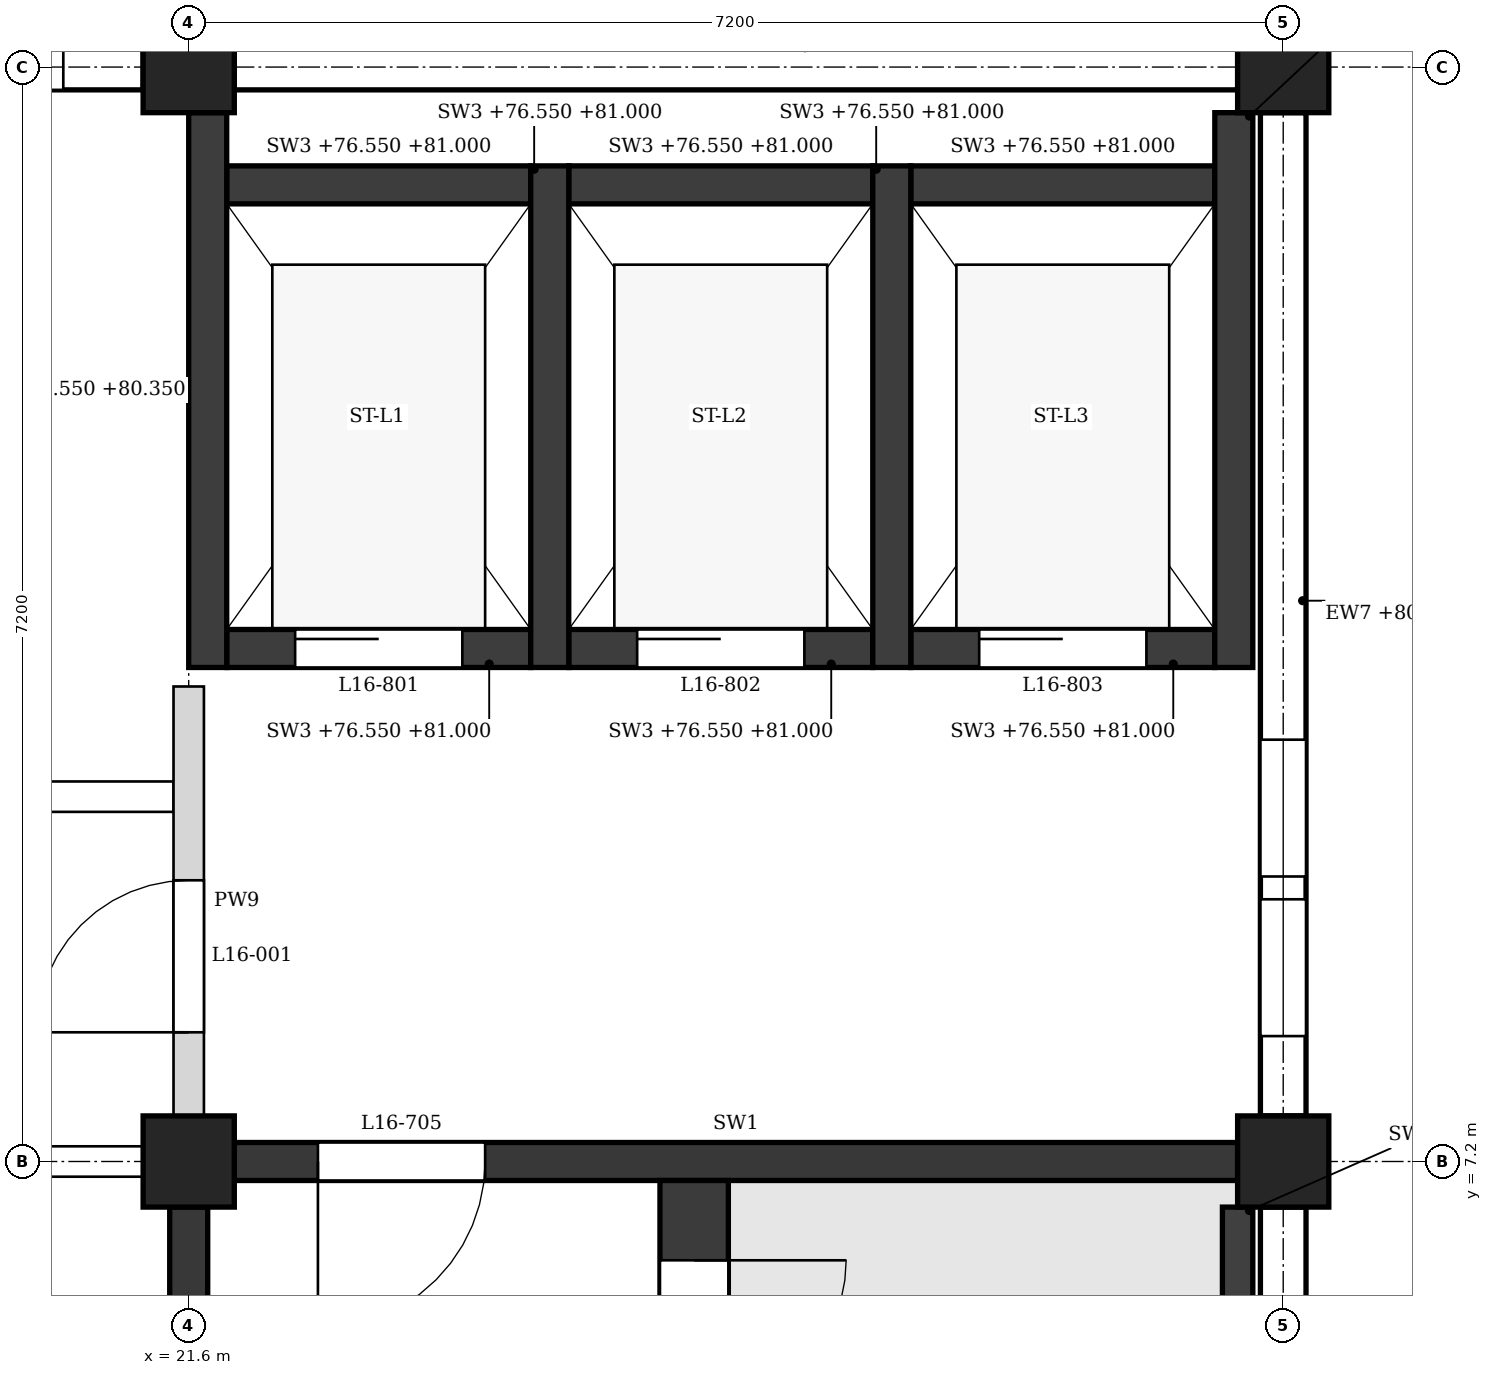
"""IFC4 building model, lengths in metres.
Left out: names, types, materials, properties, quantities, classifications, styles, units other than length and angle.
Written with IfcOpenShell. Run it as: python <this file> out.ifc"""

import sys

from ifc_helpers import new_model, si_unit, direction, frame, frame_2d, origin, origin_2d, place, context, subcontext, project, spatial, polyline, rectangle, outline, extrude, element, fill, save


model = new_model("IFC4")
c1 = context("Model", 3, precision=1e-05, world=origin(), true_north=direction((0.0, 1.0)))
c2 = subcontext(c1, "Body", "Model", "MODEL_VIEW")
j1 = project(units=[si_unit("LENGTHUNIT", "METRE"), si_unit("PLANEANGLEUNIT", "RADIAN")], contexts=[c1])
p1 = place(None, origin())
s1 = spatial("IfcSite", under=j1, at=p1, CompositionType="ELEMENT")
p2 = place(p1, origin())
s2 = spatial("IfcBuilding", under=s1, at=p2, CompositionType="ELEMENT")
p3 = place(p2, frame((0.0, 0.0, 76.8)))
s3 = spatial("IfcBuildingStorey", under=s2, at=p3, CompositionType="ELEMENT", Elevation=76.8)
for number, where, z_axis, x_axis in (
    (1, (21.6, 7.2, 0.0), (0.0, 0.0, 1.0), (1.0, 0.0, 0.0)),
    (2, (21.6, 14.4, 0.0), (0.0, 0.0, 1.0), (1.0, 0.0, 0.0)),
    (3, (28.8, 7.2, 0.0), (0.0, 0.0, 1.0), (1.0, 0.0, 0.0)),
    (4, (28.8, 14.4, 0.0), (0.0, 0.0, 1.0), (1.0, 0.0, 0.0)),
):
    element("IfcColumn", number, at=place(p3, frame(where, z_axis=z_axis, x_axis=x_axis)), inside=s3, PredefinedType="COLUMN", context=c2, shape_type="SweptSolid", body=[
        extrude(rectangle(XDim=0.6, YDim=0.6, at=origin_2d()), origin(), (0.0, 0.0, 1.0), 4.5),
    ])
p4 = place(p3, frame((28.8, 0.3, 0.0), z_axis=(0.0, 0.0, 1.0), x_axis=(0.0, 1.0, 0.0)))
e5 = element("IfcWall", 5, at=p4, inside=s3, PredefinedType="STANDARD", context=c2, shape_type="SweptSolid", body=[
    extrude(rectangle(XDim=6.6, YDim=0.3, at=frame_2d((3.3, 0.0))), origin(), (0.0, 0.0, 1.0), 3.6),
])
p5 = place(p4, frame((1.05, 0.0, 0.9)))
e6 = element("IfcOpeningElement", 6, at=p5, cuts=e5, PredefinedType="OPENING", context=c2, shape_type="SweptSolid", body=[
    extrude(outline(polyline([(0.0, 0.0), (0.9, 0.0), (0.9, 2.15), (0.45, 2.6), (0.0, 2.15), (0.0, 0.0)])), frame((0.0, 0.16, 0.0), z_axis=(0.0, -1.0, 0.0), x_axis=(1.0, 0.0, 0.0)), (0.0, 0.0, 1.0), 0.32),
])
p6 = place(p4, frame((4.65, 0.0, 0.9)))
e7 = element("IfcOpeningElement", 7, at=p6, cuts=e5, PredefinedType="OPENING", context=c2, shape_type="SweptSolid", body=[
    extrude(outline(polyline([(0.0, 0.0), (0.9, 0.0), (0.9, 2.15), (0.45, 2.6), (0.0, 2.15), (0.0, 0.0)])), frame((0.0, 0.16, 0.0), z_axis=(0.0, -1.0, 0.0), x_axis=(1.0, 0.0, 0.0)), (0.0, 0.0, 1.0), 0.32),
])
p7 = place(p3, frame((28.8, 7.5, 0.0), z_axis=(0.0, 0.0, 1.0), x_axis=(0.0, 1.0, 0.0)))
e8 = element("IfcWall", 8, at=p7, inside=s3, PredefinedType="STANDARD", context=c2, shape_type="SweptSolid", body=[
    extrude(rectangle(XDim=6.6, YDim=0.3, at=frame_2d((3.3, 0.0))), origin(), (0.0, 0.0, 1.0), 3.6),
])
p8 = place(p7, frame((0.525, 0.0, 0.9)))
e9 = element("IfcOpeningElement", 9, at=p8, cuts=e8, PredefinedType="OPENING", context=c2, shape_type="SweptSolid", body=[
    extrude(outline(polyline([(0.0, 0.0), (0.9, 0.0), (0.9, 2.15), (0.45, 2.6), (0.0, 2.15), (0.0, 0.0)])), frame((0.0, 0.16, 0.0), z_axis=(0.0, -1.0, 0.0), x_axis=(1.0, 0.0, 0.0)), (0.0, 0.0, 1.0), 0.32),
])
p9 = place(p7, frame((1.575, 0.0, 0.9)))
e10 = element("IfcOpeningElement", 10, at=p9, cuts=e8, PredefinedType="OPENING", context=c2, shape_type="SweptSolid", body=[
    extrude(outline(polyline([(0.0, 0.0), (0.9, 0.0), (0.9, 2.15), (0.45, 2.6), (0.0, 2.15), (0.0, 0.0)])), frame((0.0, 0.16, 0.0), z_axis=(0.0, -1.0, 0.0), x_axis=(1.0, 0.0, 0.0)), (0.0, 0.0, 1.0), 0.32),
])
p10 = place(p3, frame((28.5, 14.4, 0.0), z_axis=(0.0, 0.0, 1.0), x_axis=(-1.0, 0.0, 0.0)))
e11 = element("IfcWall", 11, at=p10, inside=s3, PredefinedType="STANDARD", context=c2, shape_type="SweptSolid", body=[
    extrude(rectangle(XDim=6.6, YDim=0.3, at=frame_2d((3.3, 0.0))), origin(), (0.0, 0.0, 1.0), 3.6),
])
p11 = place(p3, frame((21.3, 14.4, 0.0), z_axis=(0.0, 0.0, 1.0), x_axis=(-1.0, 0.0, 0.0)))
e12 = element("IfcWall", 12, at=p11, inside=s3, PredefinedType="STANDARD", context=c2, shape_type="SweptSolid", body=[
    extrude(rectangle(XDim=6.6, YDim=0.3, at=frame_2d((3.3, 0.0))), origin(), (0.0, 0.0, 1.0), 3.6),
])
p12 = place(p11, frame((0.525, 0.0, 0.9)))
e13 = element("IfcOpeningElement", 13, at=p12, cuts=e12, PredefinedType="OPENING", context=c2, shape_type="SweptSolid", body=[
    extrude(outline(polyline([(0.0, 0.0), (0.9, 0.0), (0.9, 2.15), (0.45, 2.6), (0.0, 2.15), (0.0, 0.0)])), frame((0.0, 0.16, 0.0), z_axis=(0.0, -1.0, 0.0), x_axis=(1.0, 0.0, 0.0)), (0.0, 0.0, 1.0), 0.32),
])
p13 = place(p11, frame((1.575, 0.0, 0.9)))
e14 = element("IfcOpeningElement", 14, at=p13, cuts=e12, PredefinedType="OPENING", context=c2, shape_type="SweptSolid", body=[
    extrude(outline(polyline([(0.0, 0.0), (0.9, 0.0), (0.9, 2.15), (0.45, 2.6), (0.0, 2.15), (0.0, 0.0)])), frame((0.0, 0.16, 0.0), z_axis=(0.0, -1.0, 0.0), x_axis=(1.0, 0.0, 0.0)), (0.0, 0.0, 1.0), 0.32),
])
p14 = place(p11, frame((4.125, 0.0, 0.9)))
e15 = element("IfcOpeningElement", 15, at=p14, cuts=e12, PredefinedType="OPENING", context=c2, shape_type="SweptSolid", body=[
    extrude(outline(polyline([(0.0, 0.0), (0.9, 0.0), (0.9, 2.15), (0.45, 2.6), (0.0, 2.15), (0.0, 0.0)])), frame((0.0, 0.16, 0.0), z_axis=(0.0, -1.0, 0.0), x_axis=(1.0, 0.0, 0.0)), (0.0, 0.0, 1.0), 0.32),
])
p15 = place(p11, frame((5.175, 0.0, 0.9)))
e16 = element("IfcOpeningElement", 16, at=p15, cuts=e12, PredefinedType="OPENING", context=c2, shape_type="SweptSolid", body=[
    extrude(outline(polyline([(0.0, 0.0), (0.9, 0.0), (0.9, 2.15), (0.45, 2.6), (0.0, 2.15), (0.0, 0.0)])), frame((0.0, 0.16, 0.0), z_axis=(0.0, -1.0, 0.0), x_axis=(1.0, 0.0, 0.0)), (0.0, 0.0, 1.0), 0.32),
])
p16 = place(p3, frame((21.9, 7.2, 0.0), z_axis=(0.0, 0.0, 1.0), x_axis=(1.0, 0.0, 0.0)))
e17 = element("IfcWall", 17, at=p16, inside=s3, PredefinedType="SHEAR", context=c2, shape_type="SweptSolid", body=[
    extrude(rectangle(XDim=6.6, YDim=0.25, at=frame_2d((3.3, 0.0))), origin(), (0.0, 0.0, 1.0), 3.55),
])
p17 = place(p16, frame((0.55, 0.0, 0.0)))
e18 = element("IfcOpeningElement", 18, at=p17, cuts=e17, PredefinedType="OPENING", context=c2, shape_type="SweptSolid", body=[
    extrude(rectangle(XDim=1.1, YDim=2.1, at=frame_2d((0.55, 1.05))), frame((0.0, 0.135, 0.0), z_axis=(0.0, -1.0, 0.0), x_axis=(1.0, 0.0, 0.0)), (0.0, 0.0, 1.0), 0.27),
])
p18 = place(p3, frame((21.6, 0.3, 0.0), z_axis=(0.0, 0.0, 1.0), x_axis=(0.0, 1.0, 0.0)))
e19 = element("IfcWall", 19, at=p18, inside=s3, PredefinedType="SHEAR", context=c2, shape_type="SweptSolid", body=[
    extrude(rectangle(XDim=6.6, YDim=0.25, at=frame_2d((3.3, 0.0))), origin(), (0.0, 0.0, 1.0), 3.55),
])
p19 = place(p3, frame((28.5, 5.85, -0.25), z_axis=(0.0, 0.0, 1.0), x_axis=(0.0, 1.0, 0.0)))
e20 = element("IfcWall", 20, at=p19, inside=s3, PredefinedType="SHEAR", context=c2, shape_type="SweptSolid", body=[
    extrude(rectangle(XDim=1.05, YDim=0.2, at=frame_2d((0.525, 0.0))), origin(), (0.0, 0.0, 1.0), 4.45),
])
p20 = place(p3, frame((24.925, 0.15, 0.0), z_axis=(0.0, 0.0, 1.0), x_axis=(0.0, 1.0, 0.0)))
e21 = element("IfcWall", 21, at=p20, inside=s3, PredefinedType="SHEAR", context=c2, shape_type="SweptSolid", body=[
    extrude(rectangle(XDim=6.925, YDim=0.45, at=frame_2d((3.462, 0.0))), origin(), (0.0, 0.0, 1.0), 4.2),
])
p21 = place(p20, frame((5.4, 0.0, 0.0)))
e22 = element("IfcOpeningElement", 22, at=p21, cuts=e21, PredefinedType="OPENING", context=c2, shape_type="SweptSolid", body=[
    extrude(rectangle(XDim=1.0, YDim=2.1, at=frame_2d((0.5, 1.05))), frame((0.0, 0.235, 0.0), z_axis=(0.0, -1.0, 0.0), x_axis=(1.0, 0.0, 0.0)), (0.0, 0.0, 1.0), 0.47),
])
p22 = place(p3, frame((21.725, 10.45, -0.25), z_axis=(0.0, 0.0, 1.0), x_axis=(0.0, 1.0, 0.0)))
e23 = element("IfcWall", 23, at=p22, inside=s3, PredefinedType="SHEAR", context=c2, shape_type="SweptSolid", body=[
    extrude(rectangle(XDim=3.65, YDim=0.25, at=frame_2d((1.825, 0.0))), origin(), (0.0, 0.0, 1.0), 3.8),
])
for number, where, z_axis, x_axis in (
    (24, (23.975, 10.45, -0.25), (0.0, 0.0, 1.0), (0.0, 1.0, 0.0)),
    (25, (26.225, 10.45, -0.25), (0.0, 0.0, 1.0), (0.0, 1.0, 0.0)),
):
    element("IfcWall", number, at=place(p3, frame(where, z_axis=z_axis, x_axis=x_axis)), inside=s3, PredefinedType="SHEAR", context=c2, shape_type="SweptSolid", body=[
        extrude(rectangle(XDim=3.3, YDim=0.25, at=frame_2d((1.65, 0.0))), origin(), (0.0, 0.0, 1.0), 4.45),
    ])
p23 = place(p3, frame((28.475, 10.45, -0.25), z_axis=(0.0, 0.0, 1.0), x_axis=(0.0, 1.0, 0.0)))
e26 = element("IfcWall", 26, at=p23, inside=s3, PredefinedType="SHEAR", context=c2, shape_type="SweptSolid", body=[
    extrude(rectangle(XDim=3.65, YDim=0.25, at=frame_2d((1.825, 0.0))), origin(), (0.0, 0.0, 1.0), 4.45),
])
p24 = place(p3, frame((21.85, 10.575, -0.25), z_axis=(0.0, 0.0, 1.0), x_axis=(1.0, 0.0, 0.0)))
e27 = element("IfcWall", 27, at=p24, inside=s3, PredefinedType="SHEAR", context=c2, shape_type="SweptSolid", body=[
    extrude(rectangle(XDim=2.0, YDim=0.25, at=frame_2d((1.0, 0.0))), origin(), (0.0, 0.0, 1.0), 4.45),
])
p25 = place(p24, frame((0.45, 0.0, 0.25)))
e28 = element("IfcOpeningElement", 28, at=p25, cuts=e27, PredefinedType="OPENING", context=c2, shape_type="SweptSolid", body=[
    extrude(rectangle(XDim=1.1, YDim=2.1, at=frame_2d((0.55, 1.05))), frame((0.0, 0.135, 0.0), z_axis=(0.0, -1.0, 0.0), x_axis=(1.0, 0.0, 0.0)), (0.0, 0.0, 1.0), 0.27),
])
p26 = place(p3, frame((21.85, 13.625, -0.25), z_axis=(0.0, 0.0, 1.0), x_axis=(1.0, 0.0, 0.0)))
e29 = element("IfcWall", 29, at=p26, inside=s3, PredefinedType="SHEAR", context=c2, shape_type="SweptSolid", body=[
    extrude(rectangle(XDim=2.0, YDim=0.25, at=frame_2d((1.0, 0.0))), origin(), (0.0, 0.0, 1.0), 4.45),
])
p27 = place(p3, frame((24.1, 10.575, -0.25), z_axis=(0.0, 0.0, 1.0), x_axis=(1.0, 0.0, 0.0)))
e30 = element("IfcWall", 30, at=p27, inside=s3, PredefinedType="SHEAR", context=c2, shape_type="SweptSolid", body=[
    extrude(rectangle(XDim=2.0, YDim=0.25, at=frame_2d((1.0, 0.0))), origin(), (0.0, 0.0, 1.0), 4.45),
])
p28 = place(p27, frame((0.45, 0.0, 0.25)))
e31 = element("IfcOpeningElement", 31, at=p28, cuts=e30, PredefinedType="OPENING", context=c2, shape_type="SweptSolid", body=[
    extrude(rectangle(XDim=1.1, YDim=2.1, at=frame_2d((0.55, 1.05))), frame((0.0, 0.135, 0.0), z_axis=(0.0, -1.0, 0.0), x_axis=(1.0, 0.0, 0.0)), (0.0, 0.0, 1.0), 0.27),
])
p29 = place(p3, frame((24.1, 13.625, -0.25), z_axis=(0.0, 0.0, 1.0), x_axis=(1.0, 0.0, 0.0)))
e32 = element("IfcWall", 32, at=p29, inside=s3, PredefinedType="SHEAR", context=c2, shape_type="SweptSolid", body=[
    extrude(rectangle(XDim=2.0, YDim=0.25, at=frame_2d((1.0, 0.0))), origin(), (0.0, 0.0, 1.0), 4.45),
])
p30 = place(p3, frame((26.35, 10.575, -0.25), z_axis=(0.0, 0.0, 1.0), x_axis=(1.0, 0.0, 0.0)))
e33 = element("IfcWall", 33, at=p30, inside=s3, PredefinedType="SHEAR", context=c2, shape_type="SweptSolid", body=[
    extrude(rectangle(XDim=2.0, YDim=0.25, at=frame_2d((1.0, 0.0))), origin(), (0.0, 0.0, 1.0), 4.45),
])
p31 = place(p30, frame((0.45, 0.0, 0.25)))
e34 = element("IfcOpeningElement", 34, at=p31, cuts=e33, PredefinedType="OPENING", context=c2, shape_type="SweptSolid", body=[
    extrude(rectangle(XDim=1.1, YDim=2.1, at=frame_2d((0.55, 1.05))), frame((0.0, 0.135, 0.0), z_axis=(0.0, -1.0, 0.0), x_axis=(1.0, 0.0, 0.0)), (0.0, 0.0, 1.0), 0.27),
])
p32 = place(p3, frame((26.35, 13.625, -0.25), z_axis=(0.0, 0.0, 1.0), x_axis=(1.0, 0.0, 0.0)))
e35 = element("IfcWall", 35, at=p32, inside=s3, PredefinedType="SHEAR", context=c2, shape_type="SweptSolid", body=[
    extrude(rectangle(XDim=2.0, YDim=0.25, at=frame_2d((1.0, 0.0))), origin(), (0.0, 0.0, 1.0), 4.45),
])
p33 = place(p3, frame((14.7, 7.2, 0.0), z_axis=(0.0, 0.0, 1.0), x_axis=(1.0, 0.0, 0.0)))
e36 = element("IfcWall", 36, at=p33, inside=s3, PredefinedType="PARTITIONING", context=c2, shape_type="SweptSolid", body=[
    extrude(rectangle(XDim=6.6, YDim=0.2, at=frame_2d((3.3, 0.0))), origin(), (0.0, 0.0, 1.0), 3.55),
])
p34 = place(p33, frame((4.45, 0.0, 0.0)))
e37 = element("IfcOpeningElement", 37, at=p34, cuts=e36, PredefinedType="OPENING", context=c2, shape_type="SweptSolid", body=[
    extrude(rectangle(XDim=1.0, YDim=2.1, at=frame_2d((0.5, 1.05))), frame((0.0, 0.11, 0.0), z_axis=(0.0, -1.0, 0.0), x_axis=(1.0, 0.0, 0.0)), (0.0, 0.0, 1.0), 0.22),
])
p35 = place(p3, frame((3.5, 9.6, 0.0), z_axis=(0.0, 0.0, 1.0), x_axis=(1.0, 0.0, 0.0)))
e38 = element("IfcWall", 38, at=p35, inside=s3, PredefinedType="PARTITIONING", context=c2, shape_type="SweptSolid", body=[
    extrude(outline(polyline([(0.0, 0.0), (18.0, 0.0), (18.0, 3.55), (17.875, 3.55), (17.875, 4.2), (11.125, 4.2), (11.125, 3.55), (10.675, 3.55), (10.675, 4.2), (3.925, 4.2), (3.925, 3.55), (3.475, 3.55), (3.475, 4.2), (0.0, 4.2), (0.0, 0.0)])), frame((0.0, 0.1, 0.0), z_axis=(0.0, -1.0, 0.0), x_axis=(1.0, 0.0, 0.0)), (0.0, 0.0, 1.0), 0.2),
])
p36 = place(p35, frame((15.75, 0.0, 0.0)))
e39 = element("IfcOpeningElement", 39, at=p36, cuts=e38, PredefinedType="OPENING", context=c2, shape_type="SweptSolid", body=[
    extrude(rectangle(XDim=1.0, YDim=2.1, at=frame_2d((0.5, 1.05))), frame((0.0, 0.11, 0.0), z_axis=(0.0, -1.0, 0.0), x_axis=(1.0, 0.0, 0.0)), (0.0, 0.0, 1.0), 0.22),
])
p37 = place(p35, frame((0.9, 0.0, 0.0)))
e40 = element("IfcOpeningElement", 40, at=p37, cuts=e38, PredefinedType="OPENING", context=c2, shape_type="SweptSolid", body=[
    extrude(rectangle(XDim=2.0, YDim=2.1, at=frame_2d((1.0, 1.05))), frame((0.0, 0.11, 0.0), z_axis=(0.0, -1.0, 0.0), x_axis=(1.0, 0.0, 0.0)), (0.0, 0.0, 1.0), 0.22),
])
p38 = place(p35, frame((6.3, 0.0, 0.0)))
e41 = element("IfcOpeningElement", 41, at=p38, cuts=e38, PredefinedType="OPENING", context=c2, shape_type="SweptSolid", body=[
    extrude(rectangle(XDim=2.0, YDim=2.1, at=frame_2d((1.0, 1.05))), frame((0.0, 0.11, 0.0), z_axis=(0.0, -1.0, 0.0), x_axis=(1.0, 0.0, 0.0)), (0.0, 0.0, 1.0), 0.22),
])
p39 = place(p35, frame((12.2, 0.0, 0.0)))
e42 = element("IfcOpeningElement", 42, at=p39, cuts=e38, PredefinedType="OPENING", context=c2, shape_type="SweptSolid", body=[
    extrude(rectangle(XDim=1.0, YDim=2.1, at=frame_2d((0.5, 1.05))), frame((0.0, 0.11, 0.0), z_axis=(0.0, -1.0, 0.0), x_axis=(1.0, 0.0, 0.0)), (0.0, 0.0, 1.0), 0.22),
])
p40 = place(p3, frame((21.6, 7.5, 0.0), z_axis=(0.0, 0.0, 1.0), x_axis=(0.0, 1.0, 0.0)))
e43 = element("IfcWall", 43, at=p40, inside=s3, PredefinedType="PARTITIONING", context=c2, shape_type="SweptSolid", body=[
    extrude(rectangle(XDim=2.825, YDim=0.2, at=frame_2d((1.413, 0.0))), origin(), (0.0, 0.0, 1.0), 3.55),
])
p41 = place(p40, frame((0.55, 0.0, 0.0)))
e44 = element("IfcOpeningElement", 44, at=p41, cuts=e43, PredefinedType="OPENING", context=c2, shape_type="SweptSolid", body=[
    extrude(rectangle(XDim=1.0, YDim=2.1, at=frame_2d((0.5, 1.05))), frame((0.0, 0.11, 0.0), z_axis=(0.0, -1.0, 0.0), x_axis=(1.0, 0.0, 0.0)), (0.0, 0.0, 1.0), 0.22),
])
p42 = place(p8, origin())
e45 = element("IfcWindow", 45, at=p42, inside=s3, PartitioningType="SINGLE_PANEL", PredefinedType="WINDOW", context=c2, shape_type="SweptSolid", body=[
    extrude(outline(polyline([(0.0, 0.0), (0.9, 0.0), (0.9, 2.15), (0.45, 2.6), (0.0, 2.15), (0.0, 0.0)])), frame((0.0, 0.03, 0.0), z_axis=(0.0, -1.0, 0.0), x_axis=(1.0, 0.0, 0.0)), (0.0, 0.0, 1.0), 0.06),
])
fill(e9, e45)
p43 = place(p9, origin())
e46 = element("IfcWindow", 46, at=p43, inside=s3, PartitioningType="SINGLE_PANEL", PredefinedType="WINDOW", context=c2, shape_type="SweptSolid", body=[
    extrude(outline(polyline([(0.0, 0.0), (0.9, 0.0), (0.9, 2.15), (0.45, 2.6), (0.0, 2.15), (0.0, 0.0)])), frame((0.0, 0.03, 0.0), z_axis=(0.0, -1.0, 0.0), x_axis=(1.0, 0.0, 0.0)), (0.0, 0.0, 1.0), 0.06),
])
fill(e10, e46)
p44 = place(p12, origin())
e47 = element("IfcWindow", 47, at=p44, inside=s3, PartitioningType="SINGLE_PANEL", PredefinedType="WINDOW", context=c2, shape_type="SweptSolid", body=[
    extrude(outline(polyline([(0.0, 0.0), (0.9, 0.0), (0.9, 2.15), (0.45, 2.6), (0.0, 2.15), (0.0, 0.0)])), frame((0.0, 0.03, 0.0), z_axis=(0.0, -1.0, 0.0), x_axis=(1.0, 0.0, 0.0)), (0.0, 0.0, 1.0), 0.06),
])
fill(e13, e47)
p45 = place(p21, frame((1.0, 0.0, 0.0), z_axis=(0.0, 0.0, 1.0), x_axis=(-1.0, 0.0, 0.0)))
e48 = element("IfcDoor", 48, at=p45, inside=s3, OperationType="SINGLE_SWING_LEFT", PredefinedType="DOOR", context=c2, shape_type="SweptSolid", body=[
    extrude(rectangle(XDim=1.0, YDim=2.1, at=frame_2d((0.5, 1.05))), frame((0.0, 0.025, 0.0), z_axis=(0.0, -1.0, 0.0), x_axis=(1.0, 0.0, 0.0)), (0.0, 0.0, 1.0), 0.05),
])
fill(e22, e48)
p46 = place(p17, frame((1.1, 0.0, 0.0), z_axis=(0.0, 0.0, 1.0), x_axis=(-1.0, 0.0, 0.0)))
e49 = element("IfcDoor", 49, at=p46, inside=s3, OperationType="SINGLE_SWING_RIGHT", PredefinedType="DOOR", context=c2, shape_type="SweptSolid", body=[
    extrude(rectangle(XDim=1.1, YDim=2.1, at=frame_2d((0.55, 1.05))), frame((0.0, 0.025, 0.0), z_axis=(0.0, -1.0, 0.0), x_axis=(1.0, 0.0, 0.0)), (0.0, 0.0, 1.0), 0.05),
])
fill(e18, e49)
p47 = place(p25, origin())
e50 = element("IfcDoor", 50, at=p47, inside=s3, OperationType="SLIDING_TO_LEFT", PredefinedType="DOOR", context=c2, shape_type="SweptSolid", body=[
    extrude(rectangle(XDim=1.1, YDim=2.1, at=frame_2d((0.55, 1.05))), frame((0.0, 0.025, 0.0), z_axis=(0.0, -1.0, 0.0), x_axis=(1.0, 0.0, 0.0)), (0.0, 0.0, 1.0), 0.05),
])
fill(e28, e50)
p48 = place(p28, origin())
e51 = element("IfcDoor", 51, at=p48, inside=s3, OperationType="SLIDING_TO_LEFT", PredefinedType="DOOR", context=c2, shape_type="SweptSolid", body=[
    extrude(rectangle(XDim=1.1, YDim=2.1, at=frame_2d((0.55, 1.05))), frame((0.0, 0.025, 0.0), z_axis=(0.0, -1.0, 0.0), x_axis=(1.0, 0.0, 0.0)), (0.0, 0.0, 1.0), 0.05),
])
fill(e31, e51)
p49 = place(p31, origin())
e52 = element("IfcDoor", 52, at=p49, inside=s3, OperationType="SLIDING_TO_LEFT", PredefinedType="DOOR", context=c2, shape_type="SweptSolid", body=[
    extrude(rectangle(XDim=1.1, YDim=2.1, at=frame_2d((0.55, 1.05))), frame((0.0, 0.025, 0.0), z_axis=(0.0, -1.0, 0.0), x_axis=(1.0, 0.0, 0.0)), (0.0, 0.0, 1.0), 0.05),
])
fill(e34, e52)
p50 = place(p41, origin())
e53 = element("IfcDoor", 53, at=p50, inside=s3, OperationType="SINGLE_SWING_LEFT", PredefinedType="DOOR", context=c2, shape_type="SweptSolid", body=[
    extrude(rectangle(XDim=1.0, YDim=2.1, at=frame_2d((0.5, 1.05))), frame((0.0, 0.025, 0.0), z_axis=(0.0, -1.0, 0.0), x_axis=(1.0, 0.0, 0.0)), (0.0, 0.0, 1.0), 0.05),
])
fill(e44, e53)
save(model, sys.argv[1])
